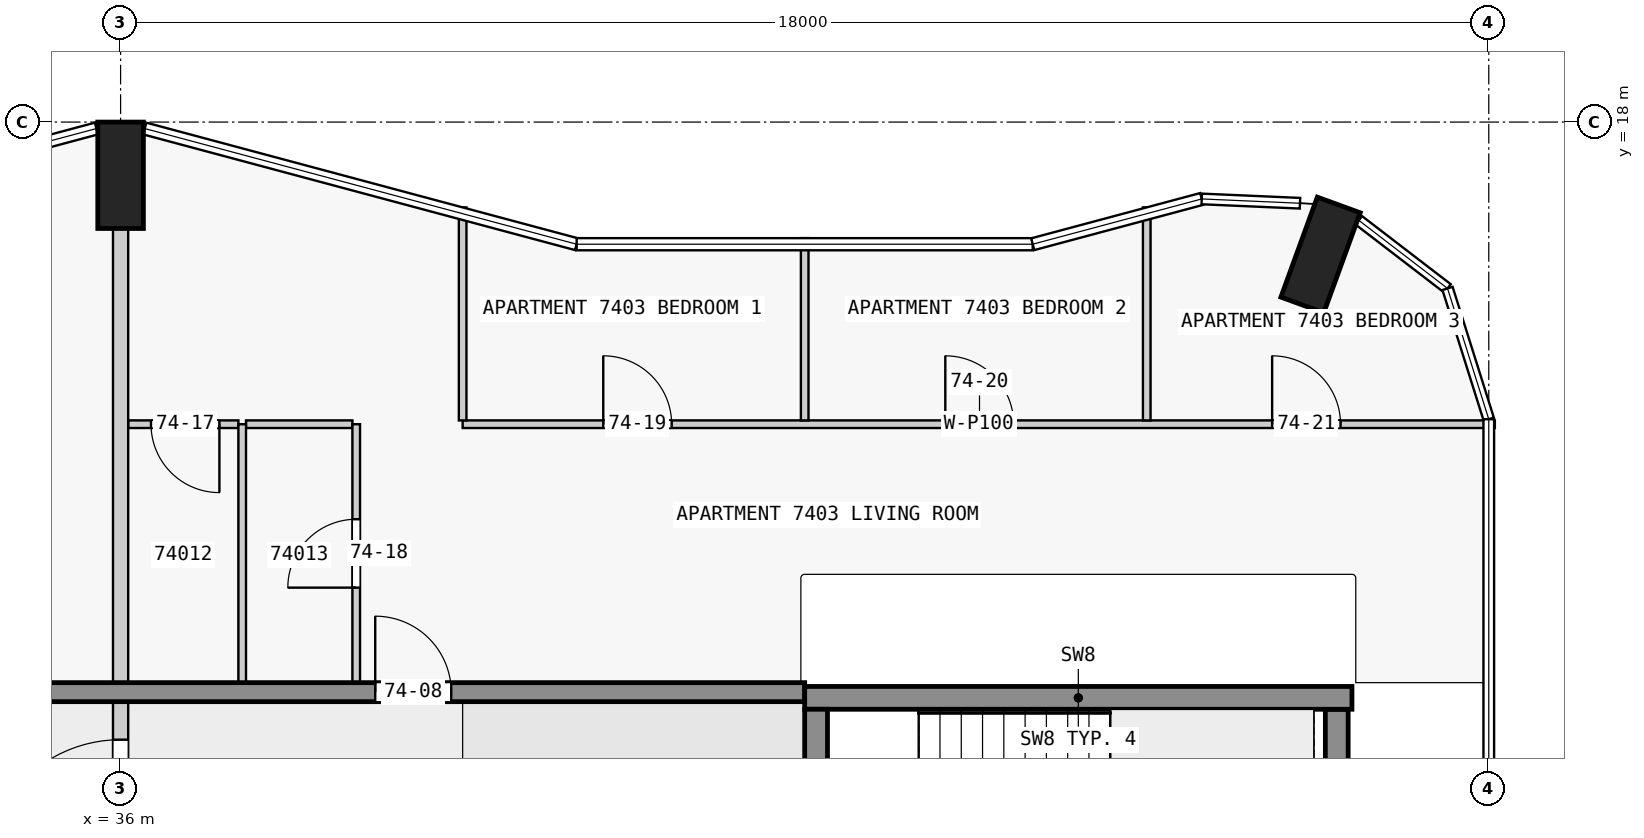
"""IFC4 building model, lengths in metres.
Left out: names, types, materials, properties, quantities, classifications, styles, units other than length and angle.
Written with IfcOpenShell. Run it as: python <this file> out.ifc"""

import sys

from ifc_helpers import new_model, si_unit, direction, frame, frame_2d, origin, origin_2d, place, context, subcontext, project, spatial, rectangle, extrude, element, fill, save


model = new_model("IFC4")
c1 = context("Model", 3, precision=1e-05, world=origin(), true_north=direction((0.0, 1.0)))
c2 = subcontext(c1, "Body", "Model", "MODEL_VIEW")
j1 = project(units=[si_unit("LENGTHUNIT", "METRE"), si_unit("PLANEANGLEUNIT", "RADIAN")], contexts=[c1])
p1 = place(None, origin())
s1 = spatial("IfcSite", under=j1, at=p1, CompositionType="ELEMENT")
p2 = place(p1, origin())
s2 = spatial("IfcBuilding", under=s1, at=p2, CompositionType="ELEMENT")
p3 = place(p2, frame((0.0, 0.0, 280.9)))
s3 = spatial("IfcBuildingStorey", under=s2, at=p3, CompositionType="ELEMENT", Elevation=280.9)
for number, where, z_axis, x_axis in (
    (1, (51.787, 16.252, 0.0), (0.0, 0.0, 1.0), (-0.94, 0.342, 0.0)),
    (2, (36.0, 17.3, 0.0), (0.0, 0.0, 1.0), (1.0, 0.0, 0.0)),
):
    element("IfcColumn", number, at=place(p3, frame(where, z_axis=z_axis, x_axis=x_axis)), inside=s3, PredefinedType="COLUMN", context=c2, shape_type="SweptSolid", body=[
        extrude(rectangle(XDim=0.6, YDim=1.4, at=origin_2d()), origin(), (0.0, 0.0, 1.0), 3.5),
    ])
p4 = place(p3, frame((45.15, 7.725, 0.0), z_axis=(0.0, 0.0, 1.0), x_axis=(0.0, 1.0, 0.0)))
e3 = element("IfcWall", 3, at=p4, inside=s3, PredefinedType="SHEAR", context=c2, shape_type="SweptSolid", body=[
    extrude(rectangle(XDim=2.55, YDim=0.3, at=frame_2d((1.275, 0.0))), origin(), (0.0, 0.0, 1.0), 3.5),
])
p5 = place(p4, frame((0.725, 0.0, 0.0)))
e4 = element("IfcOpeningElement", 4, at=p5, cuts=e3, PredefinedType="OPENING", context=c2, shape_type="SweptSolid", body=[
    extrude(rectangle(XDim=1.1, YDim=2.1, at=frame_2d((0.55, 1.05))), frame((0.0, 0.16, 0.0), z_axis=(0.0, -1.0, 0.0), x_axis=(1.0, 0.0, 0.0)), (0.0, 0.0, 1.0), 0.32),
])
p6 = place(p3, frame((52.0, 7.725, 0.0), z_axis=(0.0, 0.0, 1.0), x_axis=(0.0, 1.0, 0.0)))
e5 = element("IfcWall", 5, at=p6, inside=s3, PredefinedType="SHEAR", context=c2, shape_type="SweptSolid", body=[
    extrude(rectangle(XDim=2.55, YDim=0.3, at=frame_2d((1.275, 0.0))), origin(), (0.0, 0.0, 1.0), 3.5),
])
p7 = place(p3, frame((45.0, 10.425, 0.0), z_axis=(0.0, 0.0, 1.0), x_axis=(1.0, 0.0, 0.0)))
e6 = element("IfcWall", 6, at=p7, inside=s3, PredefinedType="SHEAR", context=c2, shape_type="SweptSolid", body=[
    extrude(rectangle(XDim=7.2, YDim=0.3, at=frame_2d((3.6, 0.0))), origin(), (0.0, 0.0, 1.0), 3.5),
])
p8 = place(p3, frame((22.5, 10.5, 0.0), z_axis=(0.0, 0.0, 1.0), x_axis=(1.0, 0.0, 0.0)))
e7 = element("IfcWall", 7, at=p8, inside=s3, PredefinedType="SHEAR", context=c2, shape_type="SweptSolid", body=[
    extrude(rectangle(XDim=22.5, YDim=0.25, at=frame_2d((11.25, 0.0))), origin(), (0.0, 0.0, 1.0), 3.25),
])
p9 = place(p8, frame((4.05, 0.0, 0.0)))
e8 = element("IfcOpeningElement", 8, at=p9, cuts=e7, PredefinedType="OPENING", context=c2, shape_type="SweptSolid", body=[
    extrude(rectangle(XDim=1.0, YDim=2.1, at=frame_2d((0.5, 1.05))), frame((0.0, 0.135, 0.0), z_axis=(0.0, -1.0, 0.0), x_axis=(1.0, 0.0, 0.0)), (0.0, 0.0, 1.0), 0.27),
])
p10 = place(p8, frame((10.35, 0.0, 0.0)))
e9 = element("IfcOpeningElement", 9, at=p10, cuts=e7, PredefinedType="OPENING", context=c2, shape_type="SweptSolid", body=[
    extrude(rectangle(XDim=1.8, YDim=2.1, at=frame_2d((0.9, 1.05))), frame((0.0, 0.135, 0.0), z_axis=(0.0, -1.0, 0.0), x_axis=(1.0, 0.0, 0.0)), (0.0, 0.0, 1.0), 0.27),
])
p11 = place(p8, frame((16.85, 0.0, 0.0)))
e10 = element("IfcOpeningElement", 10, at=p11, cuts=e7, PredefinedType="OPENING", context=c2, shape_type="SweptSolid", body=[
    extrude(rectangle(XDim=1.0, YDim=2.1, at=frame_2d((0.5, 1.05))), frame((0.0, 0.135, 0.0), z_axis=(0.0, -1.0, 0.0), x_axis=(1.0, 0.0, 0.0)), (0.0, 0.0, 1.0), 0.27),
])
p12 = place(p3, frame((37.55, 14.025, 0.0), z_axis=(0.0, 0.0, 1.0), x_axis=(-1.0, 0.0, 0.0)))
e11 = element("IfcWall", 11, at=p12, inside=s3, PredefinedType="PARTITIONING", context=c2, shape_type="SweptSolid", body=[
    extrude(rectangle(XDim=1.45, YDim=0.1, at=frame_2d((0.725, 0.0))), origin(), (0.0, 0.0, 1.0), 3.25),
])
p13 = place(p12, frame((0.25, 0.0, 0.0)))
e12 = element("IfcOpeningElement", 12, at=p13, cuts=e11, PredefinedType="OPENING", context=c2, shape_type="SweptSolid", body=[
    extrude(rectangle(XDim=0.9, YDim=2.1, at=frame_2d((0.45, 1.05))), frame((0.0, 0.06, 0.0), z_axis=(0.0, -1.0, 0.0), x_axis=(1.0, 0.0, 0.0)), (0.0, 0.0, 1.0), 0.12),
])
p14 = place(p3, frame((39.05, 14.025, 0.0), z_axis=(0.0, 0.0, 1.0), x_axis=(-1.0, 0.0, 0.0)))
e13 = element("IfcWall", 13, at=p14, inside=s3, PredefinedType="PARTITIONING", context=c2, shape_type="SweptSolid", body=[
    extrude(rectangle(XDim=1.4, YDim=0.1, at=frame_2d((0.7, 0.0))), origin(), (0.0, 0.0, 1.0), 3.25),
])
p15 = place(p3, frame((40.5, 14.025, 0.0), z_axis=(0.0, 0.0, 1.0), x_axis=(1.0, 0.0, 0.0)))
e14 = element("IfcWall", 14, at=p15, inside=s3, PredefinedType="PARTITIONING", context=c2, shape_type="SweptSolid", body=[
    extrude(rectangle(XDim=13.58, YDim=0.1, at=frame_2d((6.79, 0.0))), origin(), (0.0, 0.0, 1.0), 3.25),
])
p16 = place(p15, frame((1.85, 0.0, 0.0)))
e15 = element("IfcOpeningElement", 15, at=p16, cuts=e14, PredefinedType="OPENING", context=c2, shape_type="SweptSolid", body=[
    extrude(rectangle(XDim=0.9, YDim=2.1, at=frame_2d((0.45, 1.05))), frame((0.0, 0.06, 0.0), z_axis=(0.0, -1.0, 0.0), x_axis=(1.0, 0.0, 0.0)), (0.0, 0.0, 1.0), 0.12),
])
p17 = place(p15, frame((6.35, 0.0, 0.0)))
e16 = element("IfcOpeningElement", 16, at=p17, cuts=e14, PredefinedType="OPENING", context=c2, shape_type="SweptSolid", body=[
    extrude(rectangle(XDim=0.9, YDim=2.1, at=frame_2d((0.45, 1.05))), frame((0.0, 0.06, 0.0), z_axis=(0.0, -1.0, 0.0), x_axis=(1.0, 0.0, 0.0)), (0.0, 0.0, 1.0), 0.12),
])
p18 = place(p15, frame((10.65, 0.0, 0.0)))
e17 = element("IfcOpeningElement", 17, at=p18, cuts=e14, PredefinedType="OPENING", context=c2, shape_type="SweptSolid", body=[
    extrude(rectangle(XDim=0.9, YDim=2.1, at=frame_2d((0.45, 1.05))), frame((0.0, 0.06, 0.0), z_axis=(0.0, -1.0, 0.0), x_axis=(1.0, 0.0, 0.0)), (0.0, 0.0, 1.0), 0.12),
])
p19 = place(p3, frame((36.0, 10.625, 0.0), z_axis=(0.0, 0.0, 1.0), x_axis=(0.0, 1.0, 0.0)))
e18 = element("IfcWall", 18, at=p19, inside=s3, PredefinedType="PARTITIONING", context=c2, shape_type="SweptSolid", body=[
    extrude(rectangle(XDim=5.975, YDim=0.2, at=frame_2d((2.988, 0.0))), origin(), (0.0, 0.0, 1.0), 3.25),
])
p20 = place(p3, frame((37.6, 10.625, 0.0), z_axis=(0.0, 0.0, 1.0), x_axis=(0.0, 1.0, 0.0)))
e19 = element("IfcWall", 19, at=p20, inside=s3, PredefinedType="PARTITIONING", context=c2, shape_type="SweptSolid", body=[
    extrude(rectangle(XDim=3.4, YDim=0.1, at=frame_2d((1.7, 0.0))), origin(), (0.0, 0.0, 1.0), 3.25),
])
p21 = place(p3, frame((39.1, 10.625, 0.0), z_axis=(0.0, 0.0, 1.0), x_axis=(0.0, 1.0, 0.0)))
e20 = element("IfcWall", 20, at=p21, inside=s3, PredefinedType="PARTITIONING", context=c2, shape_type="SweptSolid", body=[
    extrude(rectangle(XDim=3.4, YDim=0.1, at=frame_2d((1.7, 0.0))), origin(), (0.0, 0.0, 1.0), 3.25),
])
p22 = place(p21, frame((1.25, 0.0, 0.0)))
e21 = element("IfcOpeningElement", 21, at=p22, cuts=e20, PredefinedType="OPENING", context=c2, shape_type="SweptSolid", body=[
    extrude(rectangle(XDim=0.9, YDim=2.1, at=frame_2d((0.45, 1.05))), frame((0.0, 0.06, 0.0), z_axis=(0.0, -1.0, 0.0), x_axis=(1.0, 0.0, 0.0)), (0.0, 0.0, 1.0), 0.12),
])
p23 = place(p3, frame((40.5, 16.878, 0.0), z_axis=(0.0, 0.0, 1.0), x_axis=(0.0, -1.0, 0.0)))
e22 = element("IfcWall", 22, at=p23, inside=s3, PredefinedType="PARTITIONING", context=c2, shape_type="SweptSolid", body=[
    extrude(rectangle(XDim=2.803, YDim=0.1, at=frame_2d((1.401, 0.0))), origin(), (0.0, 0.0, 1.0), 3.25),
])
p24 = place(p3, frame((45.0, 14.075, 0.0), z_axis=(0.0, 0.0, 1.0), x_axis=(0.0, 1.0, 0.0)))
e23 = element("IfcWall", 23, at=p24, inside=s3, PredefinedType="PARTITIONING", context=c2, shape_type="SweptSolid", body=[
    extrude(rectangle(XDim=2.398, YDim=0.1, at=frame_2d((1.199, 0.0))), origin(), (0.0, 0.0, 1.0), 3.25),
])
p25 = place(p3, frame((49.5, 14.075, 0.0), z_axis=(0.0, 0.0, 1.0), x_axis=(0.0, 1.0, 0.0)))
e24 = element("IfcWall", 24, at=p25, inside=s3, PredefinedType="PARTITIONING", context=c2, shape_type="SweptSolid", body=[
    extrude(rectangle(XDim=2.803, YDim=0.1, at=frame_2d((1.401, 0.0))), origin(), (0.0, 0.0, 1.0), 3.25),
])
p26 = place(p3, frame((36.0, 7.475, 0.0), z_axis=(0.0, 0.0, 1.0), x_axis=(0.0, 1.0, 0.0)))
e25 = element("IfcWall", 25, at=p26, inside=s3, PredefinedType="PARTITIONING", context=c2, shape_type="SweptSolid", body=[
    extrude(rectangle(XDim=3.05, YDim=0.2, at=frame_2d((1.525, 0.0))), origin(), (0.0, 0.0, 1.0), 3.25),
])
p27 = place(p26, frame((0.6, 0.0, 0.0)))
e26 = element("IfcOpeningElement", 26, at=p27, cuts=e25, PredefinedType="OPENING", context=c2, shape_type="SweptSolid", body=[
    extrude(rectangle(XDim=1.8, YDim=2.1, at=frame_2d((0.9, 1.05))), frame((0.0, 0.11, 0.0), z_axis=(0.0, -1.0, 0.0), x_axis=(1.0, 0.0, 0.0)), (0.0, 0.0, 1.0), 0.22),
])
p28 = place(p11, origin())
e27 = element("IfcDoor", 27, at=p28, inside=s3, OperationType="SINGLE_SWING_RIGHT", PredefinedType="DOOR", context=c2, shape_type="SweptSolid", body=[
    extrude(rectangle(XDim=1.0, YDim=2.1, at=frame_2d((0.5, 1.05))), frame((0.0, 0.025, 0.0), z_axis=(0.0, -1.0, 0.0), x_axis=(1.0, 0.0, 0.0)), (0.0, 0.0, 1.0), 0.05),
])
fill(e10, e27)
p29 = place(p27, origin())
e28 = element("IfcDoor", 28, at=p29, inside=s3, OperationType="SINGLE_SWING_LEFT", PredefinedType="DOOR", context=c2, shape_type="SweptSolid", body=[
    extrude(rectangle(XDim=1.8, YDim=2.1, at=frame_2d((0.9, 1.05))), frame((0.0, 0.025, 0.0), z_axis=(0.0, -1.0, 0.0), x_axis=(1.0, 0.0, 0.0)), (0.0, 0.0, 1.0), 0.05),
])
fill(e26, e28)
p30 = place(p13, origin())
e29 = element("IfcDoor", 29, at=p30, inside=s3, OperationType="SINGLE_SWING_LEFT", PredefinedType="DOOR", context=c2, shape_type="SweptSolid", body=[
    extrude(rectangle(XDim=0.9, YDim=2.1, at=frame_2d((0.45, 1.05))), frame((0.0, 0.025, 0.0), z_axis=(0.0, -1.0, 0.0), x_axis=(1.0, 0.0, 0.0)), (0.0, 0.0, 1.0), 0.05),
])
fill(e12, e29)
p31 = place(p22, origin())
e30 = element("IfcDoor", 30, at=p31, inside=s3, OperationType="SINGLE_SWING_LEFT", PredefinedType="DOOR", context=c2, shape_type="SweptSolid", body=[
    extrude(rectangle(XDim=0.9, YDim=2.1, at=frame_2d((0.45, 1.05))), frame((0.0, 0.025, 0.0), z_axis=(0.0, -1.0, 0.0), x_axis=(1.0, 0.0, 0.0)), (0.0, 0.0, 1.0), 0.05),
])
fill(e21, e30)
p32 = place(p16, origin())
e31 = element("IfcDoor", 31, at=p32, inside=s3, OperationType="SINGLE_SWING_LEFT", PredefinedType="DOOR", context=c2, shape_type="SweptSolid", body=[
    extrude(rectangle(XDim=0.9, YDim=2.1, at=frame_2d((0.45, 1.05))), frame((0.0, 0.025, 0.0), z_axis=(0.0, -1.0, 0.0), x_axis=(1.0, 0.0, 0.0)), (0.0, 0.0, 1.0), 0.05),
])
fill(e15, e31)
p33 = place(p17, origin())
e32 = element("IfcDoor", 32, at=p33, inside=s3, OperationType="SINGLE_SWING_RIGHT", PredefinedType="DOOR", context=c2, shape_type="SweptSolid", body=[
    extrude(rectangle(XDim=0.9, YDim=2.1, at=frame_2d((0.45, 1.05))), frame((0.0, 0.025, 0.0), z_axis=(0.0, -1.0, 0.0), x_axis=(1.0, 0.0, 0.0)), (0.0, 0.0, 1.0), 0.05),
])
fill(e16, e32)
p34 = place(p18, origin())
e33 = element("IfcDoor", 33, at=p34, inside=s3, OperationType="SINGLE_SWING_RIGHT", PredefinedType="DOOR", context=c2, shape_type="SweptSolid", body=[
    extrude(rectangle(XDim=0.9, YDim=2.1, at=frame_2d((0.45, 1.05))), frame((0.0, 0.025, 0.0), z_axis=(0.0, -1.0, 0.0), x_axis=(1.0, 0.0, 0.0)), (0.0, 0.0, 1.0), 0.05),
])
fill(e17, e33)
save(model, sys.argv[1])
